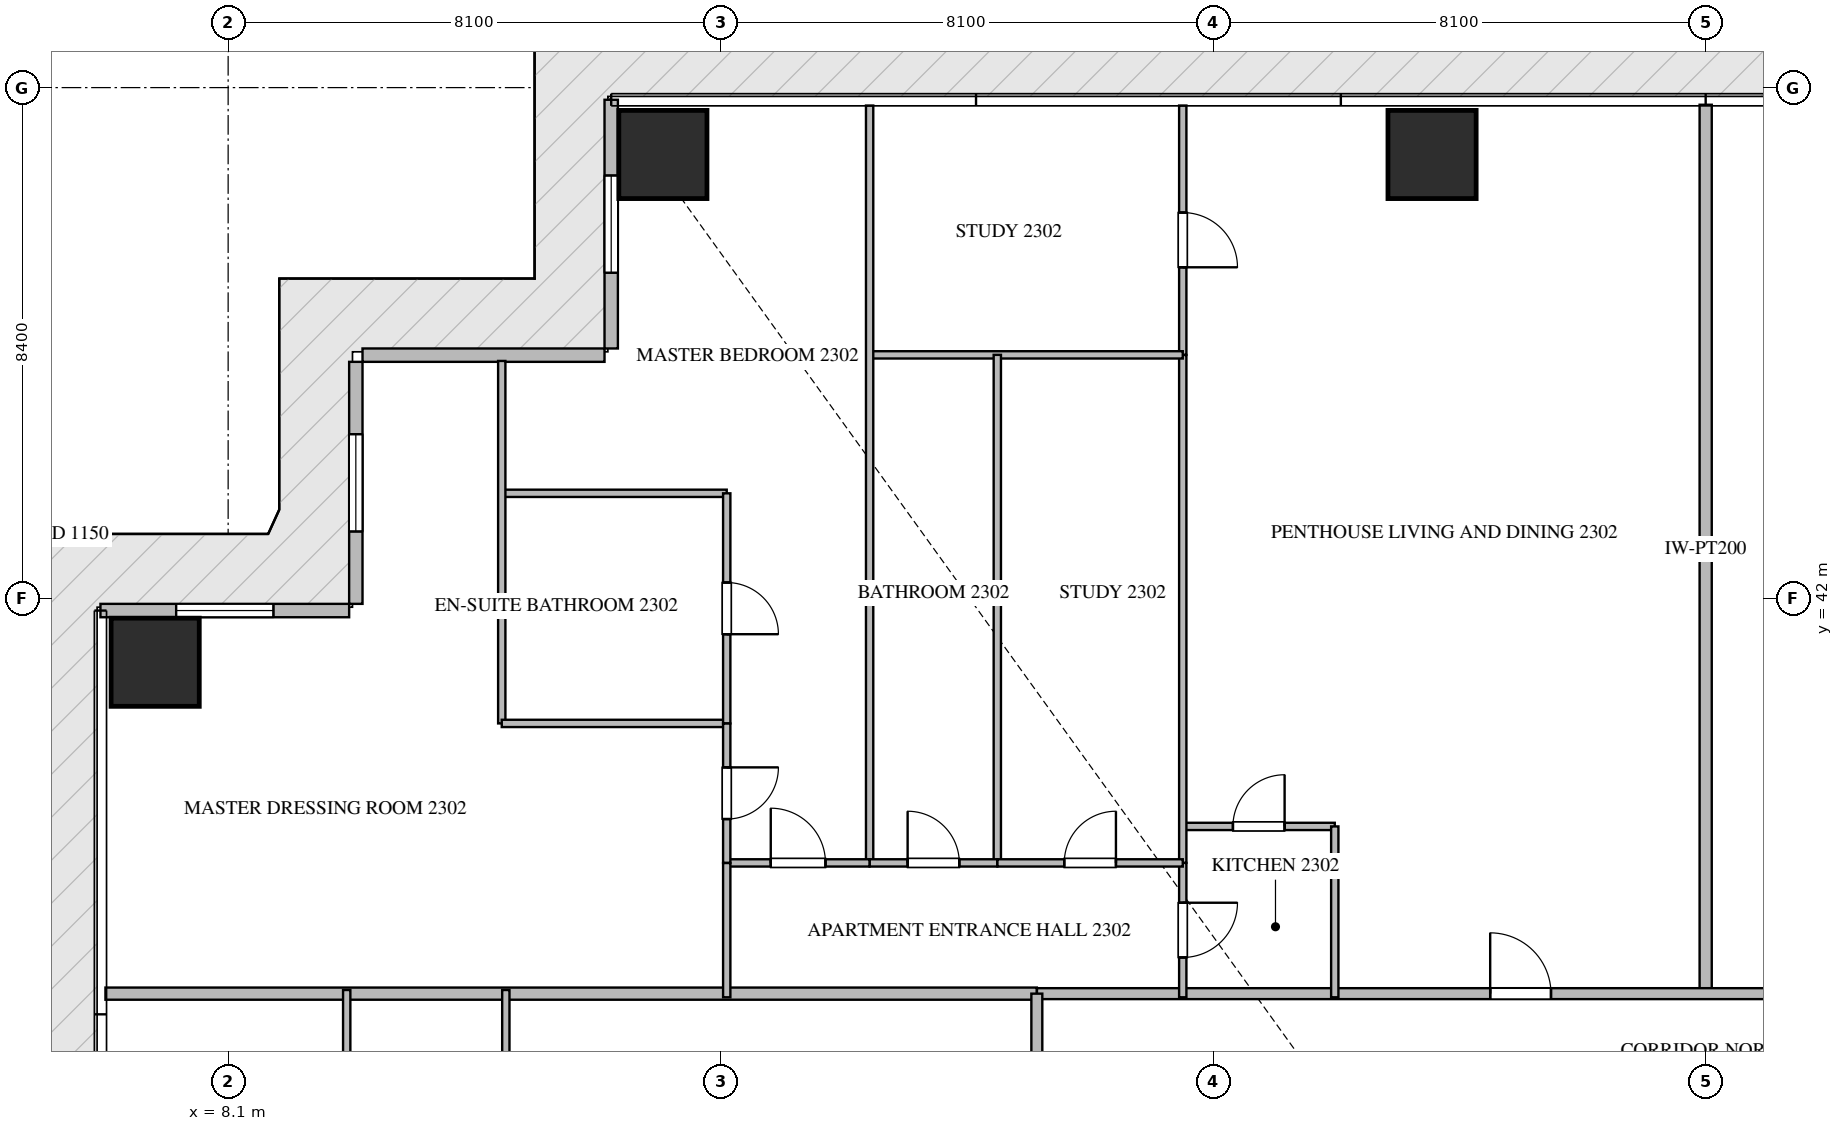
"""IFC4 building model, lengths in metres.
Left out: names, types, materials, properties, quantities, classifications, styles, units other than length and angle.
Written with IfcOpenShell. Run it as: python <this file> out.ifc"""

import sys

from ifc_helpers import new_model, si_unit, direction, frame, frame_2d, origin, origin_2d, place, context, subcontext, project, spatial, rectangle, extrude, source, transform, mapped, element, fill, save


model = new_model("IFC4")
c1 = context("Model", 3, precision=1e-05, world=origin(), true_north=direction((0.0, 1.0)))
c2 = subcontext(c1, "Body", "Model", "MODEL_VIEW")
j1 = project(units=[si_unit("LENGTHUNIT", "METRE"), si_unit("PLANEANGLEUNIT", "RADIAN")], contexts=[c1])
p1 = place(None, origin())
s1 = spatial("IfcSite", under=j1, at=p1, CompositionType="ELEMENT")
p2 = place(p1, origin())
s2 = spatial("IfcBuilding", under=s1, at=p2, CompositionType="ELEMENT")
p3 = place(p2, frame((0.0, 0.0, 94.2)))
s3 = spatial("IfcBuildingStorey", under=s2, at=p3, CompositionType="ELEMENT", Elevation=94.2)
m1 = source(origin(), c2, "Body", "SweptSolid", [
    extrude(rectangle(XDim=1.45, YDim=1.45, at=origin_2d()), origin(), (0.0, 0.0, 1.0), 3.75),
])
for number, where, z_axis, x_axis in (
    (1, (15.25, 49.3, -0.26), (0.0, 0.0, 1.0), (1.0, 0.0, 0.0)),
    (2, (27.9, 49.3, -0.26), (0.0, 0.0, 1.0), (1.0, 0.0, 0.0)),
    (3, (6.9, 40.95, -0.26), (0.0, 0.0, 1.0), (1.0, 0.0, 0.0)),
):
    element("IfcColumn", number, at=place(p3, frame(where, z_axis=z_axis, x_axis=x_axis)), inside=s3, PredefinedType="COLUMN", context=c2, shape_type="MappedRepresentation", body=[
        mapped(m1, transform((0.0, 0.0, 0.0), scale=1.0)),
    ])
p4 = place(p3, frame((14.4, 50.2, 0.0), z_axis=(0.0, 0.0, 1.0), x_axis=(0.0, -1.0, 0.0)))
e4 = element("IfcWall", 4, at=p4, inside=s3, PredefinedType="ELEMENTEDWALL", context=c2, shape_type="SweptSolid", body=[
    extrude(rectangle(XDim=4.09, YDim=0.22, at=frame_2d((2.045, 0.0))), origin(), (0.0, 0.0, 1.0), 3.475),
])
p5 = place(p4, frame((1.245, 0.0, 0.65)))
e5 = element("IfcOpeningElement", 5, at=p5, cuts=e4, PredefinedType="OPENING", context=c2, shape_type="SweptSolid", body=[
    extrude(rectangle(XDim=1.6, YDim=2.1, at=frame_2d((0.8, 1.05))), frame((0.0, 0.12, 0.0), z_axis=(0.0, -1.0, 0.0), x_axis=(1.0, 0.0, 0.0)), (0.0, 0.0, 1.0), 0.24),
])
p6 = place(p3, frame((14.29, 46.0, 0.0), z_axis=(0.0, 0.0, 1.0), x_axis=(-1.0, 0.0, 0.0)))
e6 = element("IfcWall", 6, at=p6, inside=s3, PredefinedType="ELEMENTEDWALL", context=c2, shape_type="SweptSolid", body=[
    extrude(rectangle(XDim=3.98, YDim=0.22, at=frame_2d((1.99, 0.0))), origin(), (0.0, 0.0, 1.0), 3.475),
])
p7 = place(p3, frame((10.2, 45.89, 0.0), z_axis=(0.0, 0.0, 1.0), x_axis=(0.0, -1.0, 0.0)))
e7 = element("IfcWall", 7, at=p7, inside=s3, PredefinedType="ELEMENTEDWALL", context=c2, shape_type="SweptSolid", body=[
    extrude(rectangle(XDim=3.98, YDim=0.22, at=frame_2d((1.99, 0.0))), origin(), (0.0, 0.0, 1.0), 3.475),
])
p8 = place(p7, frame((1.19, 0.0, 0.65)))
e8 = element("IfcOpeningElement", 8, at=p8, cuts=e7, PredefinedType="OPENING", context=c2, shape_type="SweptSolid", body=[
    extrude(rectangle(XDim=1.6, YDim=2.1, at=frame_2d((0.8, 1.05))), frame((0.0, 0.12, 0.0), z_axis=(0.0, -1.0, 0.0), x_axis=(1.0, 0.0, 0.0)), (0.0, 0.0, 1.0), 0.24),
])
p9 = place(p3, frame((10.09, 41.8, 0.0), z_axis=(0.0, 0.0, 1.0), x_axis=(-1.0, 0.0, 0.0)))
e9 = element("IfcWall", 9, at=p9, inside=s3, PredefinedType="ELEMENTEDWALL", context=c2, shape_type="SweptSolid", body=[
    extrude(rectangle(XDim=4.09, YDim=0.22, at=frame_2d((2.045, 0.0))), origin(), (0.0, 0.0, 1.0), 3.475),
])
p10 = place(p9, frame((1.245, 0.0, 0.65)))
e10 = element("IfcOpeningElement", 10, at=p10, cuts=e9, PredefinedType="OPENING", context=c2, shape_type="SweptSolid", body=[
    extrude(rectangle(XDim=1.6, YDim=2.1, at=frame_2d((0.8, 1.05))), frame((0.0, 0.12, 0.0), z_axis=(0.0, -1.0, 0.0), x_axis=(1.0, 0.0, 0.0)), (0.0, 0.0, 1.0), 0.24),
])
p11 = place(p3, frame((32.4, 35.5, 0.0), z_axis=(0.0, 0.0, 1.0), x_axis=(0.0, 1.0, 0.0)))
e11 = element("IfcWall", 11, at=p11, inside=s3, PredefinedType="PARTITIONING", context=c2, shape_type="SweptSolid", body=[
    extrude(rectangle(XDim=14.618, YDim=0.2, at=frame_2d((7.309, 0.0))), origin(), (0.0, 0.0, 1.0), 3.49),
])
p12 = place(p3, frame((6.082, 35.5, 0.0), z_axis=(0.0, 0.0, 1.0), x_axis=(1.0, 0.0, 0.0)))
e12 = element("IfcWall", 12, at=p12, inside=s3, PredefinedType="PARTITIONING", context=c2, shape_type="SweptSolid", body=[
    extrude(rectangle(XDim=15.318, YDim=0.2, at=frame_2d((7.659, 0.0))), origin(), (0.0, 0.0, 1.0), 3.49),
])
p13 = place(p3, frame((21.402, 35.5, 0.0), z_axis=(0.0, 0.0, 1.0), x_axis=(1.0, 0.0, 0.0)))
e13 = element("IfcWall", 13, at=p13, inside=s3, PredefinedType="PARTITIONING", context=c2, shape_type="SweptSolid", body=[
    extrude(rectangle(XDim=21.996, YDim=0.18, at=frame_2d((10.998, 0.0))), origin(), (0.0, 0.0, 1.0), 3.49),
])
p14 = place(p13, frame((7.454, 0.0, 0.0)))
e14 = element("IfcOpeningElement", 14, at=p14, cuts=e13, PredefinedType="OPENING", context=c2, shape_type="SweptSolid", body=[
    extrude(rectangle(XDim=1.0, YDim=2.15, at=frame_2d((0.5, 1.075))), frame((0.0, 0.1, 0.0), z_axis=(0.0, -1.0, 0.0), x_axis=(1.0, 0.0, 0.0)), (0.0, 0.0, 1.0), 0.2),
])
p15 = place(p13, frame((13.542, 0.0, 0.0)))
e15 = element("IfcOpeningElement", 15, at=p15, cuts=e13, PredefinedType="OPENING", context=c2, shape_type="SweptSolid", body=[
    extrude(rectangle(XDim=1.0, YDim=2.15, at=frame_2d((0.5, 1.075))), frame((0.0, 0.1, 0.0), z_axis=(0.0, -1.0, 0.0), x_axis=(1.0, 0.0, 0.0)), (0.0, 0.0, 1.0), 0.2),
])
p16 = place(p3, frame((21.4, 14.9, 0.0), z_axis=(0.0, 0.0, 1.0), x_axis=(0.0, 1.0, 0.0)))
e16 = element("IfcWall", 16, at=p16, inside=s3, PredefinedType="PARTITIONING", context=c2, shape_type="SweptSolid", body=[
    extrude(rectangle(XDim=20.6, YDim=0.18, at=frame_2d((10.3, 0.0))), origin(), (0.0, 0.0, 1.0), 3.49),
])
p17 = place(p16, frame((1.96, 0.0, 0.0)))
e17 = element("IfcOpeningElement", 17, at=p17, cuts=e16, PredefinedType="OPENING", context=c2, shape_type="SweptSolid", body=[
    extrude(rectangle(XDim=1.0, YDim=2.15, at=frame_2d((0.5, 1.075))), frame((0.0, 0.1, 0.0), z_axis=(0.0, -1.0, 0.0), x_axis=(1.0, 0.0, 0.0)), (0.0, 0.0, 1.0), 0.2),
])
p18 = place(p3, frame((23.8, 38.25, 0.0), z_axis=(0.0, 0.0, 1.0), x_axis=(1.0, 0.0, 0.0)))
e18 = element("IfcWall", 18, at=p18, inside=s3, PredefinedType="PARTITIONING", context=c2, shape_type="SweptSolid", body=[
    extrude(rectangle(XDim=2.5, YDim=0.12, at=frame_2d((1.25, 0.0))), origin(), (0.0, 0.0, 1.0), 3.49),
])
p19 = place(p18, frame((0.825, 0.0, 0.0)))
e19 = element("IfcOpeningElement", 19, at=p19, cuts=e18, PredefinedType="OPENING", context=c2, shape_type="SweptSolid", body=[
    extrude(rectangle(XDim=0.85, YDim=2.1, at=frame_2d((0.425, 1.05))), frame((0.0, 0.07, 0.0), z_axis=(0.0, -1.0, 0.0), x_axis=(1.0, 0.0, 0.0)), (0.0, 0.0, 1.0), 0.14),
])
p20 = place(p3, frame((26.3, 38.25, 0.0), z_axis=(0.0, 0.0, 1.0), x_axis=(0.0, -1.0, 0.0)))
e20 = element("IfcWall", 20, at=p20, inside=s3, PredefinedType="PARTITIONING", context=c2, shape_type="SweptSolid", body=[
    extrude(rectangle(XDim=2.81, YDim=0.12, at=frame_2d((1.405, 0.0))), origin(), (0.0, 0.0, 1.0), 3.49),
])
p21 = place(p3, frame((23.8, 37.65, 0.0), z_axis=(0.0, 0.0, 1.0), x_axis=(0.0, -1.0, 0.0)))
e21 = element("IfcWall", 21, at=p21, inside=s3, PredefinedType="PARTITIONING", context=c2, shape_type="SweptSolid", body=[
    extrude(rectangle(XDim=2.21, YDim=0.12, at=frame_2d((1.105, 0.0))), origin(), (0.0, 0.0, 1.0), 3.49),
])
p22 = place(p21, frame((0.655, 0.0, 0.0)))
e22 = element("IfcOpeningElement", 22, at=p22, cuts=e21, PredefinedType="OPENING", context=c2, shape_type="SweptSolid", body=[
    extrude(rectangle(XDim=0.9, YDim=2.1, at=frame_2d((0.45, 1.05))), frame((0.0, 0.07, 0.0), z_axis=(0.0, -1.0, 0.0), x_axis=(1.0, 0.0, 0.0)), (0.0, 0.0, 1.0), 0.14),
])
p23 = place(p3, frame((23.8, 50.105, 0.0), z_axis=(0.0, 0.0, 1.0), x_axis=(0.0, -1.0, 0.0)))
e23 = element("IfcWall", 23, at=p23, inside=s3, PredefinedType="PARTITIONING", context=c2, shape_type="SweptSolid", body=[
    extrude(rectangle(XDim=4.1, YDim=0.12, at=frame_2d((2.05, 0.0))), origin(), (0.0, 0.0, 1.0), 3.49),
])
p24 = place(p23, frame((1.76, 0.0, 0.0)))
e24 = element("IfcOpeningElement", 24, at=p24, cuts=e23, PredefinedType="OPENING", context=c2, shape_type="SweptSolid", body=[
    extrude(rectangle(XDim=0.9, YDim=2.1, at=frame_2d((0.45, 1.05))), frame((0.0, 0.07, 0.0), z_axis=(0.0, -1.0, 0.0), x_axis=(1.0, 0.0, 0.0)), (0.0, 0.0, 1.0), 0.14),
])
p25 = place(p3, frame((23.8, 46.003, 0.0), z_axis=(0.0, 0.0, 1.0), x_axis=(0.0, -1.0, 0.0)))
e25 = element("IfcWall", 25, at=p25, inside=s3, PredefinedType="PARTITIONING", context=c2, shape_type="SweptSolid", body=[
    extrude(rectangle(XDim=8.351, YDim=0.12, at=frame_2d((4.175, 0.0))), origin(), (0.0, 0.0, 1.0), 3.49),
])
p26 = place(p3, frame((18.65, 46.005, 0.0), z_axis=(0.0, 0.0, 1.0), x_axis=(1.0, 0.0, 0.0)))
e26 = element("IfcWall", 26, at=p26, inside=s3, PredefinedType="PARTITIONING", context=c2, shape_type="SweptSolid", body=[
    extrude(rectangle(XDim=5.15, YDim=0.12, at=frame_2d((2.575, 0.0))), origin(), (0.0, 0.0, 1.0), 3.49),
])
p27 = place(p3, frame((18.65, 50.105, 0.0), z_axis=(0.0, 0.0, 1.0), x_axis=(0.0, -1.0, 0.0)))
e27 = element("IfcWall", 27, at=p27, inside=s3, PredefinedType="PARTITIONING", context=c2, shape_type="SweptSolid", body=[
    extrude(rectangle(XDim=12.455, YDim=0.12, at=frame_2d((6.228, 0.0))), origin(), (0.0, 0.0, 1.0), 3.49),
])
p28 = place(p3, frame((20.75, 46.005, 0.0), z_axis=(0.0, 0.0, 1.0), x_axis=(0.0, -1.0, 0.0)))
e28 = element("IfcWall", 28, at=p28, inside=s3, PredefinedType="PARTITIONING", context=c2, shape_type="SweptSolid", body=[
    extrude(rectangle(XDim=8.355, YDim=0.12, at=frame_2d((4.177, 0.0))), origin(), (0.0, 0.0, 1.0), 3.49),
])
p29 = place(p3, frame((18.65, 37.65, 0.0), z_axis=(0.0, 0.0, 1.0), x_axis=(1.0, 0.0, 0.0)))
e29 = element("IfcWall", 29, at=p29, inside=s3, PredefinedType="PARTITIONING", context=c2, shape_type="SweptSolid", body=[
    extrude(rectangle(XDim=2.1, YDim=0.12, at=frame_2d((1.05, 0.0))), origin(), (0.0, 0.0, 1.0), 3.49),
])
p30 = place(p29, frame((0.625, 0.0, 0.0)))
e30 = element("IfcOpeningElement", 30, at=p30, cuts=e29, PredefinedType="OPENING", context=c2, shape_type="SweptSolid", body=[
    extrude(rectangle(XDim=0.85, YDim=2.1, at=frame_2d((0.425, 1.05))), frame((0.0, 0.07, 0.0), z_axis=(0.0, -1.0, 0.0), x_axis=(1.0, 0.0, 0.0)), (0.0, 0.0, 1.0), 0.14),
])
p31 = place(p3, frame((20.752, 37.65, 0.0), z_axis=(0.0, 0.0, 1.0), x_axis=(1.0, 0.0, 0.0)))
e31 = element("IfcWall", 31, at=p31, inside=s3, PredefinedType="PARTITIONING", context=c2, shape_type="SweptSolid", body=[
    extrude(rectangle(XDim=3.048, YDim=0.12, at=frame_2d((1.524, 0.0))), origin(), (0.0, 0.0, 1.0), 3.49),
])
p32 = place(p31, frame((1.099, 0.0, 0.0)))
e32 = element("IfcOpeningElement", 32, at=p32, cuts=e31, PredefinedType="OPENING", context=c2, shape_type="SweptSolid", body=[
    extrude(rectangle(XDim=0.85, YDim=2.1, at=frame_2d((0.425, 1.05))), frame((0.0, 0.07, 0.0), z_axis=(0.0, -1.0, 0.0), x_axis=(1.0, 0.0, 0.0)), (0.0, 0.0, 1.0), 0.14),
])
p33 = place(p3, frame((16.3, 37.65, 0.0), z_axis=(0.0, 0.0, 1.0), x_axis=(1.0, 0.0, 0.0)))
e33 = element("IfcWall", 33, at=p33, inside=s3, PredefinedType="PARTITIONING", context=c2, shape_type="SweptSolid", body=[
    extrude(rectangle(XDim=2.348, YDim=0.12, at=frame_2d((1.174, 0.0))), origin(), (0.0, 0.0, 1.0), 3.49),
])
p34 = place(p33, frame((0.724, 0.0, 0.0)))
e34 = element("IfcOpeningElement", 34, at=p34, cuts=e33, PredefinedType="OPENING", context=c2, shape_type="SweptSolid", body=[
    extrude(rectangle(XDim=0.9, YDim=2.1, at=frame_2d((0.45, 1.05))), frame((0.0, 0.07, 0.0), z_axis=(0.0, -1.0, 0.0), x_axis=(1.0, 0.0, 0.0)), (0.0, 0.0, 1.0), 0.14),
])
p35 = place(p3, frame((12.6, 43.728, 0.0), z_axis=(0.0, 0.0, 1.0), x_axis=(1.0, 0.0, 0.0)))
e35 = element("IfcWall", 35, at=p35, inside=s3, PredefinedType="PARTITIONING", context=c2, shape_type="SweptSolid", body=[
    extrude(rectangle(XDim=3.7, YDim=0.12, at=frame_2d((1.85, 0.0))), origin(), (0.0, 0.0, 1.0), 3.49),
])
p36 = place(p3, frame((12.6, 45.905, 0.0), z_axis=(0.0, 0.0, 1.0), x_axis=(0.0, -1.0, 0.0)))
e36 = element("IfcWall", 36, at=p36, inside=s3, PredefinedType="PARTITIONING", context=c2, shape_type="SweptSolid", body=[
    extrude(rectangle(XDim=5.961, YDim=0.12, at=frame_2d((2.98, 0.0))), origin(), (0.0, 0.0, 1.0), 3.49),
])
p37 = place(p3, frame((12.6, 39.944, 0.0), z_axis=(0.0, 0.0, 1.0), x_axis=(1.0, 0.0, 0.0)))
e37 = element("IfcWall", 37, at=p37, inside=s3, PredefinedType="PARTITIONING", context=c2, shape_type="SweptSolid", body=[
    extrude(rectangle(XDim=3.7, YDim=0.12, at=frame_2d((1.85, 0.0))), origin(), (0.0, 0.0, 1.0), 3.49),
])
p38 = place(p3, frame((16.3, 43.728, 0.0), z_axis=(0.0, 0.0, 1.0), x_axis=(0.0, -1.0, 0.0)))
e38 = element("IfcWall", 38, at=p38, inside=s3, PredefinedType="PARTITIONING", context=c2, shape_type="SweptSolid", body=[
    extrude(rectangle(XDim=3.784, YDim=0.12, at=frame_2d((1.892, 0.0))), origin(), (0.0, 0.0, 1.0), 3.49),
])
p39 = place(p38, frame((1.467, 0.0, 0.0)))
e39 = element("IfcOpeningElement", 39, at=p39, cuts=e38, PredefinedType="OPENING", context=c2, shape_type="SweptSolid", body=[
    extrude(rectangle(XDim=0.85, YDim=2.1, at=frame_2d((0.425, 1.05))), frame((0.0, 0.07, 0.0), z_axis=(0.0, -1.0, 0.0), x_axis=(1.0, 0.0, 0.0)), (0.0, 0.0, 1.0), 0.14),
])
p40 = place(p3, frame((16.3, 39.942, 0.0), z_axis=(0.0, 0.0, 1.0), x_axis=(0.0, -1.0, 0.0)))
e40 = element("IfcWall", 40, at=p40, inside=s3, PredefinedType="PARTITIONING", context=c2, shape_type="SweptSolid", body=[
    extrude(rectangle(XDim=2.292, YDim=0.12, at=frame_2d((1.146, 0.0))), origin(), (0.0, 0.0, 1.0), 3.49),
])
p41 = place(p40, frame((0.721, 0.0, 0.0)))
e41 = element("IfcOpeningElement", 41, at=p41, cuts=e40, PredefinedType="OPENING", context=c2, shape_type="SweptSolid", body=[
    extrude(rectangle(XDim=0.85, YDim=2.1, at=frame_2d((0.425, 1.05))), frame((0.0, 0.07, 0.0), z_axis=(0.0, -1.0, 0.0), x_axis=(1.0, 0.0, 0.0)), (0.0, 0.0, 1.0), 0.14),
])
p42 = place(p3, frame((16.3, 37.648, 0.0), z_axis=(0.0, 0.0, 1.0), x_axis=(0.0, -1.0, 0.0)))
e42 = element("IfcWall", 42, at=p42, inside=s3, PredefinedType="PARTITIONING", context=c2, shape_type="SweptSolid", body=[
    extrude(rectangle(XDim=2.208, YDim=0.12, at=frame_2d((1.104, 0.0))), origin(), (0.0, 0.0, 1.0), 3.49),
])
for number, where, z_axis, x_axis in (
    (43, (10.05, 30.15, 0.0), (0.0, 0.0, 1.0), (0.0, 1.0, 0.0)),
    (44, (12.667, 30.15, 0.0), (0.0, 0.0, 1.0), (0.0, 1.0, 0.0)),
):
    element("IfcWall", number, at=place(p3, frame(where, z_axis=z_axis, x_axis=x_axis)), inside=s3, PredefinedType="PARTITIONING", context=c2, shape_type="SweptSolid", body=[
        extrude(rectangle(XDim=5.41, YDim=0.12, at=frame_2d((2.705, 0.0))), origin(), (0.0, 0.0, 1.0), 3.49),
    ])
m2 = source(origin(), c2, "Body", "SweptSolid", [
    extrude(rectangle(XDim=1.6, YDim=2.1, at=frame_2d((0.8, 1.05))), frame((0.0, 0.03, 0.0), z_axis=(0.0, -1.0, 0.0), x_axis=(1.0, 0.0, 0.0)), (0.0, 0.0, 1.0), 0.06),
])
p43 = place(p5, origin())
e45 = element("IfcWindow", 45, at=p43, inside=s3, PartitioningType="SINGLE_PANEL", PredefinedType="WINDOW", context=c2, shape_type="MappedRepresentation", body=[
    mapped(m2, transform((0.0, 0.0, 0.0), scale=1.0)),
])
fill(e5, e45)
p44 = place(p8, origin())
e46 = element("IfcWindow", 46, at=p44, inside=s3, PartitioningType="SINGLE_PANEL", PredefinedType="WINDOW", context=c2, shape_type="MappedRepresentation", body=[
    mapped(m2, transform((0.0, 0.0, 0.0), scale=1.0)),
])
fill(e8, e46)
p45 = place(p10, origin())
e47 = element("IfcWindow", 47, at=p45, inside=s3, PartitioningType="SINGLE_PANEL", PredefinedType="WINDOW", context=c2, shape_type="MappedRepresentation", body=[
    mapped(m2, transform((0.0, 0.0, 0.0), scale=1.0)),
])
fill(e10, e47)
m3 = source(origin(), c2, "Body", "SweptSolid", [
    extrude(rectangle(XDim=1.0, YDim=2.15, at=frame_2d((0.5, 1.075))), frame((0.0, 0.025, 0.0), z_axis=(0.0, -1.0, 0.0), x_axis=(1.0, 0.0, 0.0)), (0.0, 0.0, 1.0), 0.05),
])
p46 = place(p14, origin())
e48 = element("IfcDoor", 48, at=p46, inside=s3, OperationType="SINGLE_SWING_LEFT", PredefinedType="DOOR", context=c2, shape_type="MappedRepresentation", body=[
    mapped(m3, transform((0.0, 0.0, 0.0), scale=1.0)),
])
fill(e14, e48)
m4 = source(origin(), c2, "Body", "SweptSolid", [
    extrude(rectangle(XDim=0.85, YDim=2.1, at=frame_2d((0.425, 1.05))), frame((0.0, 0.025, 0.0), z_axis=(0.0, -1.0, 0.0), x_axis=(1.0, 0.0, 0.0)), (0.0, 0.0, 1.0), 0.05),
])
p47 = place(p19, origin())
e49 = element("IfcDoor", 49, at=p47, inside=s3, OperationType="SINGLE_SWING_RIGHT", PredefinedType="DOOR", context=c2, shape_type="MappedRepresentation", body=[
    mapped(m4, transform((0.0, 0.0, 0.0), scale=1.0)),
])
fill(e19, e49)
m5 = source(origin(), c2, "Body", "SweptSolid", [
    extrude(rectangle(XDim=0.9, YDim=2.1, at=frame_2d((0.45, 1.05))), frame((0.0, 0.025, 0.0), z_axis=(0.0, -1.0, 0.0), x_axis=(1.0, 0.0, 0.0)), (0.0, 0.0, 1.0), 0.05),
])
p48 = place(p22, origin())
e50 = element("IfcDoor", 50, at=p48, inside=s3, OperationType="SINGLE_SWING_LEFT", PredefinedType="DOOR", context=c2, shape_type="MappedRepresentation", body=[
    mapped(m5, transform((0.0, 0.0, 0.0), scale=1.0)),
])
fill(e22, e50)
p49 = place(p24, origin())
e51 = element("IfcDoor", 51, at=p49, inside=s3, OperationType="SINGLE_SWING_RIGHT", PredefinedType="DOOR", context=c2, shape_type="MappedRepresentation", body=[
    mapped(m5, transform((0.0, 0.0, 0.0), scale=1.0)),
])
fill(e24, e51)
p50 = place(p30, origin())
e52 = element("IfcDoor", 52, at=p50, inside=s3, OperationType="SINGLE_SWING_LEFT", PredefinedType="DOOR", context=c2, shape_type="MappedRepresentation", body=[
    mapped(m4, transform((0.0, 0.0, 0.0), scale=1.0)),
])
fill(e30, e52)
p51 = place(p32, origin())
e53 = element("IfcDoor", 53, at=p51, inside=s3, OperationType="SINGLE_SWING_RIGHT", PredefinedType="DOOR", context=c2, shape_type="MappedRepresentation", body=[
    mapped(m4, transform((0.0, 0.0, 0.0), scale=1.0)),
])
fill(e32, e53)
p52 = place(p34, origin())
e54 = element("IfcDoor", 54, at=p52, inside=s3, OperationType="SINGLE_SWING_LEFT", PredefinedType="DOOR", context=c2, shape_type="MappedRepresentation", body=[
    mapped(m5, transform((0.0, 0.0, 0.0), scale=1.0)),
])
fill(e34, e54)
p53 = place(p39, origin())
e55 = element("IfcDoor", 55, at=p53, inside=s3, OperationType="SINGLE_SWING_RIGHT", PredefinedType="DOOR", context=c2, shape_type="MappedRepresentation", body=[
    mapped(m4, transform((0.0, 0.0, 0.0), scale=1.0)),
])
fill(e39, e55)
p54 = place(p41, origin())
e56 = element("IfcDoor", 56, at=p54, inside=s3, OperationType="SINGLE_SWING_LEFT", PredefinedType="DOOR", context=c2, shape_type="MappedRepresentation", body=[
    mapped(m4, transform((0.0, 0.0, 0.0), scale=1.0)),
])
fill(e41, e56)
save(model, sys.argv[1])
